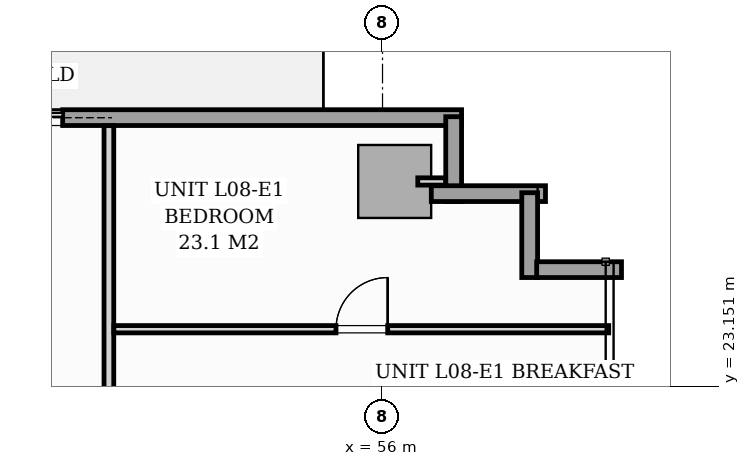
"""IFC4 building model, lengths in metres.
Left out: names, types, materials, properties, quantities, classifications, styles, units other than length and angle.
Written with IfcOpenShell. Run it as: python <this file> out.ifc"""

import sys

from ifc_helpers import new_model, si_unit, direction, frame, frame_2d, origin, origin_2d, place, context, subcontext, project, spatial, rectangle, extrude, source, transform, mapped, element, fill, save


model = new_model("IFC4")
c1 = context("Model", 3, precision=1e-05, world=origin(), true_north=direction((0.0, 1.0)))
c2 = subcontext(c1, "Body", "Model", "MODEL_VIEW")
j1 = project(units=[si_unit("LENGTHUNIT", "METRE"), si_unit("PLANEANGLEUNIT", "RADIAN")], contexts=[c1])
p1 = place(None, origin())
s1 = spatial("IfcSite", under=j1, at=p1, CompositionType="ELEMENT")
p2 = place(p1, origin())
s2 = spatial("IfcBuilding", under=s1, at=p2, CompositionType="ELEMENT")
p3 = place(p2, frame((0.0, 0.0, 32.6)))
s3 = spatial("IfcBuildingStorey", under=s2, at=p3, CompositionType="ELEMENT", Elevation=32.6)
m1 = source(origin(), c2, "Body", "SweptSolid", [
    extrude(rectangle(XDim=1.2, YDim=1.2, at=origin_2d()), origin(), (0.0, 0.0, 1.0), 3.196),
])
p4 = place(p3, frame((56.2, 26.52, 0.002), z_axis=(0.0, 0.0, 1.0), x_axis=(1.0, 0.0, 0.0)))
e1 = element("IfcColumn", 1, at=p4, inside=s3, PredefinedType="COLUMN", context=c2, shape_type="MappedRepresentation", body=[
    mapped(m1, transform((0.0, 0.0, 0.0), scale=1.0)),
])
p5 = place(p3, frame((40.15, 27.57, 0.0), z_axis=(0.0, 0.0, 1.0), x_axis=(1.0, 0.0, 0.0)))
e2 = element("IfcWall", 2, at=p5, inside=s3, PredefinedType="STANDARD", context=c2, shape_type="SweptSolid", body=[
    extrude(rectangle(XDim=17.15, YDim=0.26, at=frame_2d((8.575, 0.0))), origin(), (0.0, 0.0, 1.0), 2.94),
])
p6 = place(p5, frame((8.79, 0.0, 0.0)))
e3 = element("IfcOpeningElement", 3, at=p6, cuts=e2, PredefinedType="OPENING", context=c2, shape_type="SweptSolid", body=[
    extrude(rectangle(XDim=1.8, YDim=2.06, at=frame_2d((0.9, 1.03))), frame((0.0, 0.14, 0.0), z_axis=(0.0, -1.0, 0.0), x_axis=(1.0, 0.0, 0.0)), (0.0, 0.0, 1.0), 0.28),
])
p7 = place(p5, frame((0.7, 0.0, 0.65)))
e4 = element("IfcOpeningElement", 4, at=p7, cuts=e2, PredefinedType="OPENING", context=c2, shape_type="SweptSolid", body=[
    extrude(rectangle(XDim=1.6, YDim=1.5, at=frame_2d((0.8, 0.75))), frame((0.0, 0.14, 0.0), z_axis=(0.0, -1.0, 0.0), x_axis=(1.0, 0.0, 0.0)), (0.0, 0.0, 1.0), 0.28),
])
p8 = place(p3, frame((57.17, 27.585, 0.0), z_axis=(0.0, 0.0, 1.0), x_axis=(0.0, -1.0, 0.0)))
e5 = element("IfcWall", 5, at=p8, inside=s3, PredefinedType="STANDARD", context=c2, shape_type="SweptSolid", body=[
    extrude(rectangle(XDim=1.395, YDim=0.26, at=frame_2d((0.698, 0.0))), origin(), (0.0, 0.0, 1.0), 2.94),
])
p9 = place(p3, frame((56.802, 26.32, 0.0), z_axis=(0.0, 0.0, 1.0), x_axis=(1.0, 0.0, 0.0)))
e6 = element("IfcWall", 6, at=p9, inside=s3, PredefinedType="STANDARD", context=c2, shape_type="SweptSolid", body=[
    extrude(rectangle(XDim=1.878, YDim=0.26, at=frame_2d((0.939, 0.0))), origin(), (0.0, 0.0, 1.0), 2.94),
])
for number, where, z_axis, x_axis in (
    (7, (58.42, 26.335, 0.0), (0.0, 0.0, 1.0), (0.0, -1.0, 0.0)),
    (8, (58.535, 25.07, 0.0), (0.0, 0.0, 1.0), (1.0, 0.0, 0.0)),
):
    element("IfcWall", number, at=place(p3, frame(where, z_axis=z_axis, x_axis=x_axis)), inside=s3, PredefinedType="STANDARD", context=c2, shape_type="SweptSolid", body=[
        extrude(rectangle(XDim=1.395, YDim=0.26, at=frame_2d((0.698, 0.0))), origin(), (0.0, 0.0, 1.0), 2.94),
    ])
p10 = place(p3, frame((51.5, 12.572, 0.0), z_axis=(0.0, 0.0, 1.0), x_axis=(0.0, 1.0, 0.0)))
e9 = element("IfcWall", 9, at=p10, inside=s3, PredefinedType="PARTITIONING", context=c2, shape_type="SweptSolid", body=[
    extrude(rectangle(XDim=14.866, YDim=0.16, at=frame_2d((7.433, 0.0))), origin(), (0.0, 0.0, 1.0), 2.94),
])
p11 = place(p10, frame((0.37, 0.0, 0.0)))
e10 = element("IfcOpeningElement", 10, at=p11, cuts=e9, PredefinedType="OPENING", context=c2, shape_type="SweptSolid", body=[
    extrude(rectangle(XDim=0.95, YDim=2.06, at=frame_2d((0.475, 1.03))), frame((0.0, 0.09, 0.0), z_axis=(0.0, -1.0, 0.0), x_axis=(1.0, 0.0, 0.0)), (0.0, 0.0, 1.0), 0.18),
])
p12 = place(p3, frame((51.582, 24.09, 0.0), z_axis=(0.0, 0.0, 1.0), x_axis=(1.0, 0.0, 0.0)))
e11 = element("IfcWall", 11, at=p12, inside=s3, PredefinedType="PARTITIONING", context=c2, shape_type="SweptSolid", body=[
    extrude(rectangle(XDim=8.138, YDim=0.12, at=frame_2d((4.069, 0.0))), origin(), (0.0, 0.0, 1.0), 2.94),
])
p13 = place(p12, frame((3.653, 0.0, 0.0)))
e12 = element("IfcOpeningElement", 12, at=p13, cuts=e11, PredefinedType="OPENING", context=c2, shape_type="SweptSolid", body=[
    extrude(rectangle(XDim=0.85, YDim=2.05, at=frame_2d((0.425, 1.025))), frame((0.0, 0.07, 0.0), z_axis=(0.0, -1.0, 0.0), x_axis=(1.0, 0.0, 0.0)), (0.0, 0.0, 1.0), 0.14),
])
p14 = place(p3, frame((56.58, 26.52, 0.0), z_axis=(0.0, 0.0, 1.0), x_axis=(1.0, 0.0, 0.0)))
e13 = element("IfcWall", 13, at=p14, inside=s3, PredefinedType="PARTITIONING", context=c2, shape_type="SweptSolid", body=[
    extrude(rectangle(XDim=0.458, YDim=0.12, at=frame_2d((0.229, 0.0))), origin(), (0.0, 0.0, 1.0), 2.94),
])
m2 = source(origin(), c2, "Body", "SweptSolid", [
    extrude(rectangle(XDim=1.8, YDim=2.06, at=frame_2d((0.9, 1.03))), frame((0.0, 0.025, 0.0), z_axis=(0.0, -1.0, 0.0), x_axis=(1.0, 0.0, 0.0)), (0.0, 0.0, 1.0), 0.05),
])
p15 = place(p6, origin())
e14 = element("IfcDoor", 14, at=p15, inside=s3, OperationType="SLIDING_TO_RIGHT", PredefinedType="DOOR", context=c2, shape_type="MappedRepresentation", body=[
    mapped(m2, transform((0.0, 0.0, 0.0), scale=1.0)),
])
fill(e3, e14)
m3 = source(origin(), c2, "Body", "SweptSolid", [
    extrude(rectangle(XDim=0.85, YDim=2.05, at=frame_2d((0.425, 1.025))), frame((0.0, 0.025, 0.0), z_axis=(0.0, -1.0, 0.0), x_axis=(1.0, 0.0, 0.0)), (0.0, 0.0, 1.0), 0.05),
])
p16 = place(p13, origin())
e15 = element("IfcDoor", 15, at=p16, inside=s3, OperationType="SINGLE_SWING_RIGHT", PredefinedType="DOOR", context=c2, shape_type="MappedRepresentation", body=[
    mapped(m3, transform((0.0, 0.0, 0.0), scale=1.0)),
])
fill(e12, e15)
save(model, sys.argv[1])
